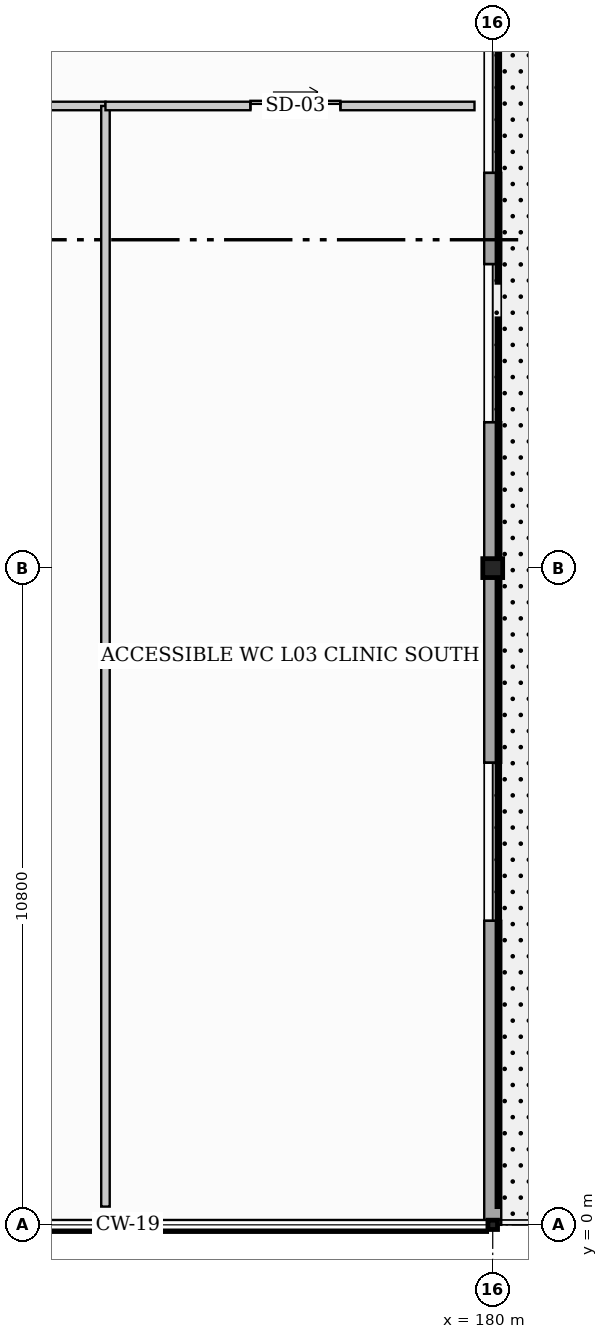
"""IFC4 building model, lengths in metres.
Left out: names, types, materials, properties, quantities, classifications, styles, units other than length and angle.
Written with IfcOpenShell. Run it as: python <this file> out.ifc"""

import sys

from ifc_helpers import new_model, si_unit, direction, frame, frame_2d, origin, origin_2d, place, context, subcontext, project, spatial, rectangle, i_section, extrude, element, fill, save


model = new_model("IFC4")
c1 = context("Model", 3, precision=1e-05, world=origin(), true_north=direction((0.0, 1.0)))
c2 = subcontext(c1, "Body", "Model", "MODEL_VIEW")
j1 = project(units=[si_unit("LENGTHUNIT", "METRE"), si_unit("PLANEANGLEUNIT", "RADIAN")], contexts=[c1])
p1 = place(None, origin())
s1 = spatial("IfcSite", under=j1, at=p1, CompositionType="ELEMENT")
p2 = place(p1, origin())
s2 = spatial("IfcBuilding", under=s1, at=p2, CompositionType="ELEMENT")
p3 = place(p2, frame((0.0, 0.0, 14.4)))
s3 = spatial("IfcBuildingStorey", under=s2, at=p3, CompositionType="ELEMENT", Elevation=14.4)
p4 = place(p3, frame((180.0, 0.0, 0.0), z_axis=(0.0, 0.0, 1.0), x_axis=(0.0, 1.0, 0.0)))
e1 = element("IfcColumn", 1, at=p4, inside=s3, PredefinedType="COLUMN", context=c2, shape_type="SweptSolid", body=[
    extrude(i_section(OverallWidth=0.153, OverallDepth=0.158, WebThickness=0.007, FlangeThickness=0.01, at=origin_2d()), origin(), (0.0, 0.0, 1.0), 3.9),
])
p5 = place(p3, frame((180.0, 10.8, 0.0), z_axis=(0.0, 0.0, 1.0), x_axis=(0.0, 1.0, 0.0)))
e2 = element("IfcColumn", 2, at=p5, inside=s3, PredefinedType="COLUMN", context=c2, shape_type="SweptSolid", body=[
    extrude(i_section(OverallWidth=0.311, OverallDepth=0.327, WebThickness=0.016, FlangeThickness=0.025, at=origin_2d()), origin(), (0.0, 0.0, 1.0), 3.9),
])
p6 = place(p3, frame((180.0, 45.6, 0.0), z_axis=(0.0, 0.0, 1.0), x_axis=(0.0, -1.0, 0.0)))
e3 = element("IfcWall", 3, at=p6, inside=s3, PredefinedType="STANDARD", context=c2, shape_type="SweptSolid", body=[
    extrude(rectangle(XDim=45.6, YDim=0.28, at=frame_2d((22.8, 0.0))), origin(), (0.0, 0.0, 1.0), 3.193),
])
p7 = place(p6, frame((6.0, 0.0, 0.0)))
e4 = element("IfcOpeningElement", 4, at=p7, cuts=e3, PredefinedType="OPENING", context=c2, shape_type="SweptSolid", body=[
    extrude(rectangle(XDim=2.02, YDim=2.2, at=frame_2d((1.01, 1.1))), frame((0.0, 0.15, 0.0), z_axis=(0.0, -1.0, 0.0), x_axis=(1.0, 0.0, 0.0)), (0.0, 0.0, 1.0), 0.3),
])
p8 = place(p6, frame((1.1, 0.0, 0.95)))
e5 = element("IfcOpeningElement", 5, at=p8, cuts=e3, PredefinedType="OPENING", context=c2, shape_type="SweptSolid", body=[
    extrude(rectangle(XDim=2.6, YDim=1.6, at=frame_2d((1.3, 0.8))), frame((0.0, 0.15, 0.0), z_axis=(0.0, -1.0, 0.0), x_axis=(1.0, 0.0, 0.0)), (0.0, 0.0, 1.0), 0.3),
])
p9 = place(p6, frame((13.4, 0.0, 0.95)))
e6 = element("IfcOpeningElement", 6, at=p9, cuts=e3, PredefinedType="OPENING", context=c2, shape_type="SweptSolid", body=[
    extrude(rectangle(XDim=2.6, YDim=1.6, at=frame_2d((1.3, 0.8))), frame((0.0, 0.15, 0.0), z_axis=(0.0, -1.0, 0.0), x_axis=(1.0, 0.0, 0.0)), (0.0, 0.0, 1.0), 0.3),
])
p10 = place(p6, frame((17.5, 0.0, 0.95)))
e7 = element("IfcOpeningElement", 7, at=p10, cuts=e3, PredefinedType="OPENING", context=c2, shape_type="SweptSolid", body=[
    extrude(rectangle(XDim=2.6, YDim=1.6, at=frame_2d((1.3, 0.8))), frame((0.0, 0.15, 0.0), z_axis=(0.0, -1.0, 0.0), x_axis=(1.0, 0.0, 0.0)), (0.0, 0.0, 1.0), 0.3),
])
p11 = place(p6, frame((25.7, 0.0, 0.95)))
e8 = element("IfcOpeningElement", 8, at=p11, cuts=e3, PredefinedType="OPENING", context=c2, shape_type="SweptSolid", body=[
    extrude(rectangle(XDim=2.6, YDim=1.6, at=frame_2d((1.3, 0.8))), frame((0.0, 0.15, 0.0), z_axis=(0.0, -1.0, 0.0), x_axis=(1.0, 0.0, 0.0)), (0.0, 0.0, 1.0), 0.3),
])
p12 = place(p6, frame((29.8, 0.0, 0.95)))
e9 = element("IfcOpeningElement", 9, at=p12, cuts=e3, PredefinedType="OPENING", context=c2, shape_type="SweptSolid", body=[
    extrude(rectangle(XDim=2.6, YDim=1.6, at=frame_2d((1.3, 0.8))), frame((0.0, 0.15, 0.0), z_axis=(0.0, -1.0, 0.0), x_axis=(1.0, 0.0, 0.0)), (0.0, 0.0, 1.0), 0.3),
])
p13 = place(p6, frame((38.0, 0.0, 0.95)))
e10 = element("IfcOpeningElement", 10, at=p13, cuts=e3, PredefinedType="OPENING", context=c2, shape_type="SweptSolid", body=[
    extrude(rectangle(XDim=2.6, YDim=1.6, at=frame_2d((1.3, 0.8))), frame((0.0, 0.15, 0.0), z_axis=(0.0, -1.0, 0.0), x_axis=(1.0, 0.0, 0.0)), (0.0, 0.0, 1.0), 0.3),
])
p14 = place(p3, frame((162.506, 18.4, 0.0), z_axis=(0.0, 0.0, 1.0), x_axis=(1.0, 0.0, 0.0)))
e11 = element("IfcWall", 11, at=p14, inside=s3, PredefinedType="PARTITIONING", context=c2, shape_type="SweptSolid", body=[
    extrude(rectangle(XDim=11.125, YDim=0.14, at=frame_2d((5.562, 0.0))), origin(), (0.0, 0.0, 1.0), 3.283),
])
p15 = place(p14, frame((4.913, 0.0, 0.0)))
e12 = element("IfcOpeningElement", 12, at=p15, cuts=e11, PredefinedType="OPENING", context=c2, shape_type="SweptSolid", body=[
    extrude(rectangle(XDim=1.62, YDim=2.3, at=frame_2d((0.81, 1.15))), frame((0.0, 0.08, 0.0), z_axis=(0.0, -1.0, 0.0), x_axis=(1.0, 0.0, 0.0)), (0.0, 0.0, 1.0), 0.16),
])
p16 = place(p3, frame((173.631, 0.3, 0.0), z_axis=(0.0, 0.0, 1.0), x_axis=(0.0, 1.0, 0.0)))
e13 = element("IfcWall", 13, at=p16, inside=s3, PredefinedType="PARTITIONING", context=c2, shape_type="SweptSolid", body=[
    extrude(rectangle(XDim=18.1, YDim=0.14, at=frame_2d((9.05, 0.0))), origin(), (0.0, 0.0, 1.0), 3.193),
])
p17 = place(p3, frame((173.631, 18.4, 0.0), z_axis=(0.0, 0.0, 1.0), x_axis=(1.0, 0.0, 0.0)))
e14 = element("IfcWall", 14, at=p17, inside=s3, PredefinedType="PARTITIONING", context=c2, shape_type="SweptSolid", body=[
    extrude(rectangle(XDim=6.069, YDim=0.14, at=frame_2d((3.034, 0.0))), origin(), (0.0, 0.0, 1.0), 3.352),
])
p18 = place(p17, frame((2.384, 0.0, 0.0)))
e15 = element("IfcOpeningElement", 15, at=p18, cuts=e14, PredefinedType="OPENING", context=c2, shape_type="SweptSolid", body=[
    extrude(rectangle(XDim=1.48, YDim=2.26, at=frame_2d((0.74, 1.13))), frame((0.0, 0.08, 0.0), z_axis=(0.0, -1.0, 0.0), x_axis=(1.0, 0.0, 0.0)), (0.0, 0.0, 1.0), 0.16),
])
p19 = place(p11, origin())
e16 = element("IfcWindow", 16, at=p19, inside=s3, PartitioningType="TRIPLE_PANEL_VERTICAL", PredefinedType="WINDOW", context=c2, shape_type="SweptSolid", body=[
    extrude(rectangle(XDim=2.6, YDim=1.6, at=frame_2d((1.3, 0.8))), frame((0.0, 0.03, 0.0), z_axis=(0.0, -1.0, 0.0), x_axis=(1.0, 0.0, 0.0)), (0.0, 0.0, 1.0), 0.06),
])
fill(e8, e16)
p20 = place(p12, origin())
e17 = element("IfcWindow", 17, at=p20, inside=s3, PartitioningType="TRIPLE_PANEL_VERTICAL", PredefinedType="WINDOW", context=c2, shape_type="SweptSolid", body=[
    extrude(rectangle(XDim=2.6, YDim=1.6, at=frame_2d((1.3, 0.8))), frame((0.0, 0.03, 0.0), z_axis=(0.0, -1.0, 0.0), x_axis=(1.0, 0.0, 0.0)), (0.0, 0.0, 1.0), 0.06),
])
fill(e9, e17)
p21 = place(p13, origin())
e18 = element("IfcWindow", 18, at=p21, inside=s3, PartitioningType="TRIPLE_PANEL_VERTICAL", PredefinedType="WINDOW", context=c2, shape_type="SweptSolid", body=[
    extrude(rectangle(XDim=2.6, YDim=1.6, at=frame_2d((1.3, 0.8))), frame((0.0, 0.03, 0.0), z_axis=(0.0, -1.0, 0.0), x_axis=(1.0, 0.0, 0.0)), (0.0, 0.0, 1.0), 0.06),
])
fill(e10, e18)
p22 = place(p18, origin())
e19 = element("IfcDoor", 19, at=p22, inside=s3, OperationType="SLIDING_TO_LEFT", PredefinedType="DOOR", context=c2, shape_type="SweptSolid", body=[
    extrude(rectangle(XDim=1.48, YDim=2.26, at=frame_2d((0.74, 1.13))), frame((0.0, 0.025, 0.0), z_axis=(0.0, -1.0, 0.0), x_axis=(1.0, 0.0, 0.0)), (0.0, 0.0, 1.0), 0.05),
])
fill(e15, e19)
save(model, sys.argv[1])
